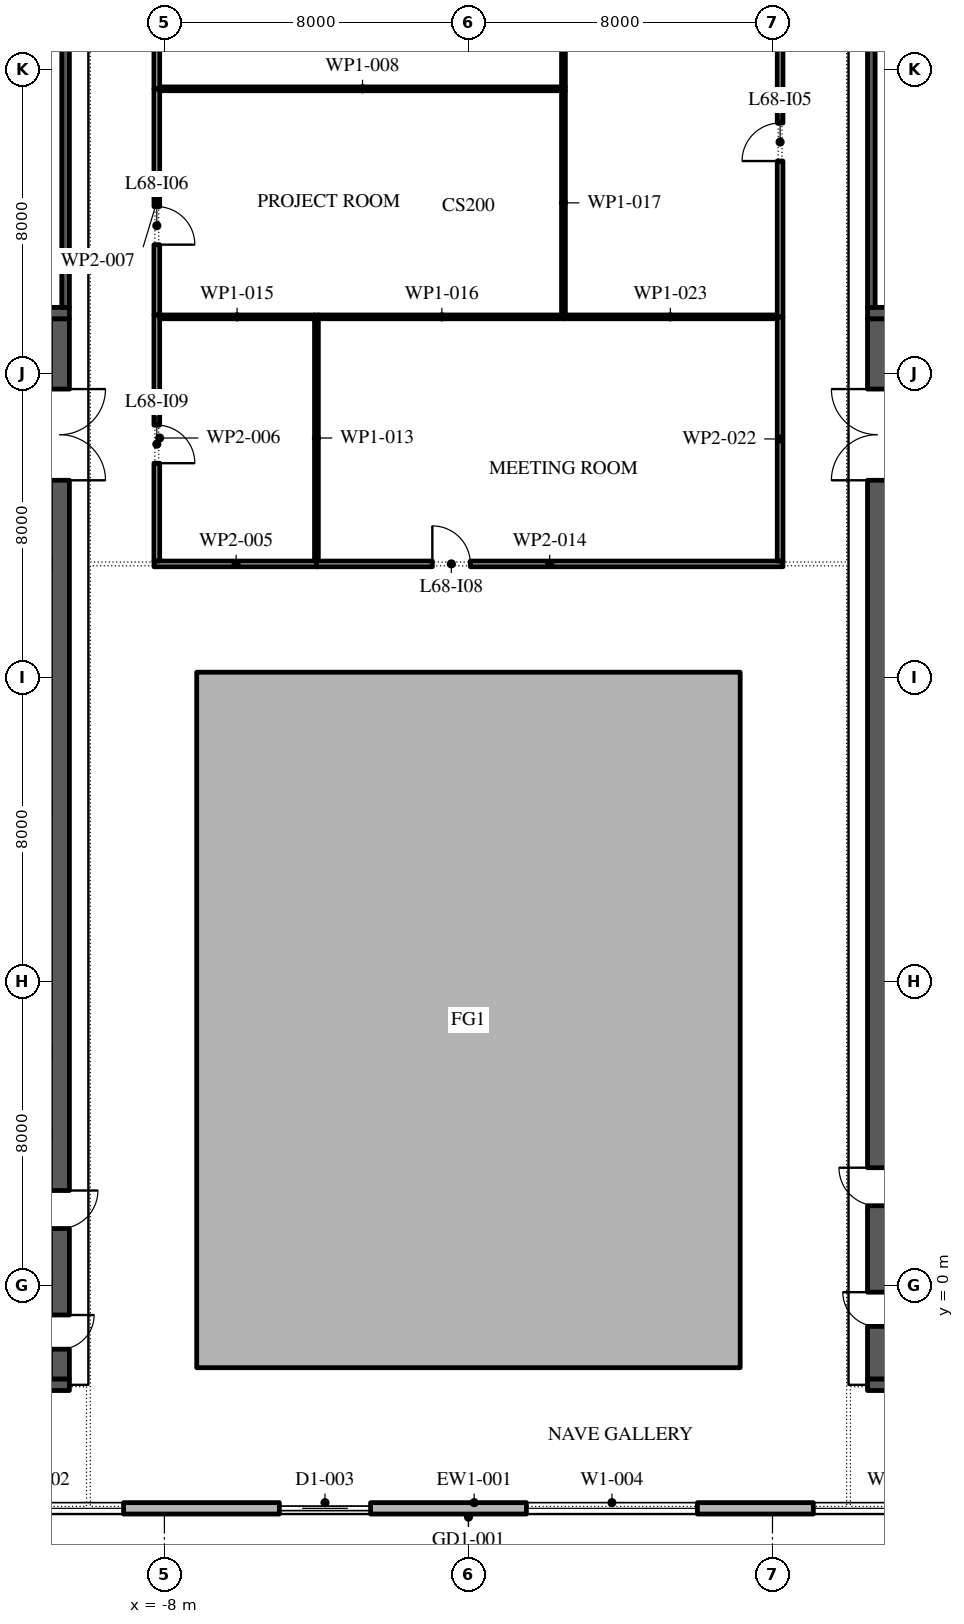
"""IFC4 building model, lengths in metres.
Left out: names, types, materials, properties, quantities, classifications, styles, units other than length and angle.
Written with IfcOpenShell. Run it as: python <this file> out.ifc"""

import sys

from ifc_helpers import new_model, si_unit, direction, frame, frame_2d, origin, place, context, subcontext, project, spatial, polyline, rectangle, outline, extrude, element, fill, save


model = new_model("IFC4")
c1 = context("Model", 3, precision=1e-05, world=origin(), true_north=direction((0.0, 1.0)))
c2 = subcontext(c1, "Body", "Model", "MODEL_VIEW")
j1 = project(units=[si_unit("LENGTHUNIT", "METRE"), si_unit("PLANEANGLEUNIT", "RADIAN")], contexts=[c1])
p1 = place(None, origin())
s1 = spatial("IfcSite", under=j1, at=p1, CompositionType="ELEMENT")
p2 = place(p1, origin())
s2 = spatial("IfcBuilding", under=s1, at=p2, CompositionType="ELEMENT")
p3 = place(p2, frame((0.0, 0.0, 313.2)))
s3 = spatial("IfcBuildingStorey", under=s2, at=p3, CompositionType="ELEMENT", Elevation=313.2)
p4 = place(p3, origin())
e1 = element("IfcWall", 1, at=p4, inside=s3, PredefinedType="STANDARD", context=c2, shape_type="SweptSolid", body=[
    extrude(outline(polyline([(-7.15, -2.15), (7.15, -2.15), (7.15, 16.15), (-7.15, 16.15), (-7.15, -2.15)]), holes=[polyline([(-7.0, -2.0), (-7.0, 16.0), (7.0, 16.0), (7.0, -2.0), (-7.0, -2.0)])]), origin(), (0.0, 0.0, 1.0), 4.0),
])
p5 = place(p3, frame((-22.35, -5.85, 0.0), z_axis=(0.0, 0.0, 1.0), x_axis=(1.0, 0.0, 0.0)))
e2 = element("IfcWall", 2, at=p5, inside=s3, PredefinedType="STANDARD", context=c2, shape_type="SweptSolid", body=[
    extrude(rectangle(XDim=45.0, YDim=0.3, at=frame_2d((22.5, 0.0))), origin(), (0.0, 0.0, 1.0), 4.0),
])
p6 = place(p5, frame((1.375, 0.0, 0.45)))
e3 = element("IfcOpeningElement", 3, at=p6, cuts=e2, PredefinedType="OPENING", context=c2, shape_type="SweptSolid", body=[
    extrude(rectangle(XDim=4.5, YDim=3.05, at=frame_2d((2.25, 1.525))), frame((0.0, 0.16, 0.0), z_axis=(0.0, -1.0, 0.0), x_axis=(1.0, 0.0, 0.0)), (0.0, 0.0, 1.0), 0.32),
])
p7 = place(p5, frame((8.775, 0.0, 0.45)))
e4 = element("IfcOpeningElement", 4, at=p7, cuts=e2, PredefinedType="OPENING", context=c2, shape_type="SweptSolid", body=[
    extrude(rectangle(XDim=4.5, YDim=3.05, at=frame_2d((2.25, 1.525))), frame((0.0, 0.16, 0.0), z_axis=(0.0, -1.0, 0.0), x_axis=(1.0, 0.0, 0.0)), (0.0, 0.0, 1.0), 0.32),
])
p8 = place(p5, frame((17.375, 0.0, 0.0)))
e5 = element("IfcOpeningElement", 5, at=p8, cuts=e2, PredefinedType="OPENING", context=c2, shape_type="SweptSolid", body=[
    extrude(rectangle(XDim=2.4, YDim=3.5, at=frame_2d((1.2, 1.75))), frame((0.0, 0.16, 0.0), z_axis=(0.0, -1.0, 0.0), x_axis=(1.0, 0.0, 0.0)), (0.0, 0.0, 1.0), 0.32),
])
p9 = place(p5, frame((23.875, 0.0, 0.45)))
e6 = element("IfcOpeningElement", 6, at=p9, cuts=e2, PredefinedType="OPENING", context=c2, shape_type="SweptSolid", body=[
    extrude(rectangle(XDim=4.5, YDim=3.05, at=frame_2d((2.25, 1.525))), frame((0.0, 0.16, 0.0), z_axis=(0.0, -1.0, 0.0), x_axis=(1.0, 0.0, 0.0)), (0.0, 0.0, 1.0), 0.32),
])
p10 = place(p5, frame((31.425, 0.0, 0.45)))
e7 = element("IfcOpeningElement", 7, at=p10, cuts=e2, PredefinedType="OPENING", context=c2, shape_type="SweptSolid", body=[
    extrude(rectangle(XDim=4.5, YDim=3.05, at=frame_2d((2.25, 1.525))), frame((0.0, 0.16, 0.0), z_axis=(0.0, -1.0, 0.0), x_axis=(1.0, 0.0, 0.0)), (0.0, 0.0, 1.0), 0.32),
])
p11 = place(p5, frame((38.975, 0.0, 0.45)))
e8 = element("IfcOpeningElement", 8, at=p11, cuts=e2, PredefinedType="OPENING", context=c2, shape_type="SweptSolid", body=[
    extrude(rectangle(XDim=4.5, YDim=3.05, at=frame_2d((2.25, 1.525))), frame((0.0, 0.16, 0.0), z_axis=(0.0, -1.0, 0.0), x_axis=(1.0, 0.0, 0.0)), (0.0, 0.0, 1.0), 0.32),
])
p12 = place(p3, frame((-10.75, -2.45, 0.0), z_axis=(0.0, 0.0, 1.0), x_axis=(0.0, 1.0, 0.0)))
e9 = element("IfcWall", 9, at=p12, inside=s3, PredefinedType="SHEAR", context=c2, shape_type="SweptSolid", body=[
    extrude(rectangle(XDim=27.9, YDim=0.5, at=frame_2d((13.95, 0.0))), origin(), (0.0, 0.0, 1.0), 4.0),
])
p13 = place(p12, frame((23.65, 0.0, 0.0)))
e10 = element("IfcOpeningElement", 10, at=p13, cuts=e9, PredefinedType="OPENING", context=c2, shape_type="SweptSolid", body=[
    extrude(rectangle(XDim=2.4, YDim=2.1, at=frame_2d((1.2, 1.05))), frame((0.0, 0.26, 0.0), z_axis=(0.0, -1.0, 0.0), x_axis=(1.0, 0.0, 0.0)), (0.0, 0.0, 1.0), 0.52),
])
p14 = place(p12, frame((0.788, 0.0, 0.0)))
e11 = element("IfcOpeningElement", 11, at=p14, cuts=e9, PredefinedType="OPENING", context=c2, shape_type="SweptSolid", body=[
    extrude(rectangle(XDim=0.9, YDim=2.1, at=frame_2d((0.45, 1.05))), frame((0.0, 0.26, 0.0), z_axis=(0.0, -1.0, 0.0), x_axis=(1.0, 0.0, 0.0)), (0.0, 0.0, 1.0), 0.52),
])
p15 = place(p12, frame((3.962, 0.0, 0.0)))
e12 = element("IfcOpeningElement", 12, at=p15, cuts=e9, PredefinedType="OPENING", context=c2, shape_type="SweptSolid", body=[
    extrude(rectangle(XDim=1.0, YDim=2.1, at=frame_2d((0.5, 1.05))), frame((0.0, 0.26, 0.0), z_axis=(0.0, -1.0, 0.0), x_axis=(1.0, 0.0, 0.0)), (0.0, 0.0, 1.0), 0.52),
])
for number, where, z_axis, x_axis in (
    (13, (-21.5, -2.6, 0.0), (0.0, 0.0, 1.0), (1.0, 0.0, 0.0)),
    (14, (-21.5, 25.6, 0.0), (0.0, 0.0, 1.0), (1.0, 0.0, 0.0)),
):
    element("IfcWall", number, at=place(p3, frame(where, z_axis=z_axis, x_axis=x_axis)), inside=s3, PredefinedType="SHEAR", context=c2, shape_type="SweptSolid", body=[
        extrude(rectangle(XDim=11.0, YDim=0.3, at=frame_2d((5.5, 0.0))), origin(), (0.0, 0.0, 1.0), 4.0),
    ])
p16 = place(p3, frame((-10.6, 25.75, 0.0), z_axis=(0.0, 0.0, 1.0), x_axis=(0.0, 1.0, 0.0)))
e15 = element("IfcWall", 15, at=p16, inside=s3, PredefinedType="SHEAR", context=c2, shape_type="SweptSolid", body=[
    extrude(rectangle(XDim=15.05, YDim=0.2, at=frame_2d((7.525, 0.0))), origin(), (0.0, 0.0, 1.0), 4.0),
])
p17 = place(p16, frame((7.075, 0.0, 0.0)))
e16 = element("IfcOpeningElement", 16, at=p17, cuts=e15, PredefinedType="OPENING", context=c2, shape_type="SweptSolid", body=[
    extrude(rectangle(XDim=0.9, YDim=2.1, at=frame_2d((0.45, 1.05))), frame((0.0, 0.11, 0.0), z_axis=(0.0, -1.0, 0.0), x_axis=(1.0, 0.0, 0.0)), (0.0, 0.0, 1.0), 0.22),
])
p18 = place(p3, frame((10.75, -2.45, 0.0), z_axis=(0.0, 0.0, 1.0), x_axis=(0.0, 1.0, 0.0)))
e17 = element("IfcWall", 17, at=p18, inside=s3, PredefinedType="SHEAR", context=c2, shape_type="SweptSolid", body=[
    extrude(rectangle(XDim=27.9, YDim=0.5, at=frame_2d((13.95, 0.0))), origin(), (0.0, 0.0, 1.0), 4.0),
])
p19 = place(p18, frame((23.65, 0.0, 0.0)))
e18 = element("IfcOpeningElement", 18, at=p19, cuts=e17, PredefinedType="OPENING", context=c2, shape_type="SweptSolid", body=[
    extrude(rectangle(XDim=2.4, YDim=2.1, at=frame_2d((1.2, 1.05))), frame((0.0, 0.26, 0.0), z_axis=(0.0, -1.0, 0.0), x_axis=(1.0, 0.0, 0.0)), (0.0, 0.0, 1.0), 0.52),
])
p20 = place(p18, frame((1.387, 0.0, 0.0)))
e19 = element("IfcOpeningElement", 19, at=p20, cuts=e17, PredefinedType="OPENING", context=c2, shape_type="SweptSolid", body=[
    extrude(rectangle(XDim=0.9, YDim=2.1, at=frame_2d((0.45, 1.05))), frame((0.0, 0.26, 0.0), z_axis=(0.0, -1.0, 0.0), x_axis=(1.0, 0.0, 0.0)), (0.0, 0.0, 1.0), 0.52),
])
p21 = place(p18, frame((4.562, 0.0, 0.0)))
e20 = element("IfcOpeningElement", 20, at=p21, cuts=e17, PredefinedType="OPENING", context=c2, shape_type="SweptSolid", body=[
    extrude(rectangle(XDim=1.0, YDim=2.1, at=frame_2d((0.5, 1.05))), frame((0.0, 0.26, 0.0), z_axis=(0.0, -1.0, 0.0), x_axis=(1.0, 0.0, 0.0)), (0.0, 0.0, 1.0), 0.52),
])
for number, where, z_axis, x_axis in (
    (21, (10.5, -2.6, 0.0), (0.0, 0.0, 1.0), (1.0, 0.0, 0.0)),
    (22, (10.5, 25.6, 0.0), (0.0, 0.0, 1.0), (1.0, 0.0, 0.0)),
):
    element("IfcWall", number, at=place(p3, frame(where, z_axis=z_axis, x_axis=x_axis)), inside=s3, PredefinedType="SHEAR", context=c2, shape_type="SweptSolid", body=[
        extrude(rectangle(XDim=11.0, YDim=0.3, at=frame_2d((5.5, 0.0))), origin(), (0.0, 0.0, 1.0), 4.0),
    ])
p22 = place(p3, frame((10.6, 25.75, 0.0), z_axis=(0.0, 0.0, 1.0), x_axis=(0.0, 1.0, 0.0)))
e23 = element("IfcWall", 23, at=p22, inside=s3, PredefinedType="SHEAR", context=c2, shape_type="SweptSolid", body=[
    extrude(rectangle(XDim=15.05, YDim=0.2, at=frame_2d((7.525, 0.0))), origin(), (0.0, 0.0, 1.0), 4.0),
])
p23 = place(p22, frame((7.075, 0.0, 0.0)))
e24 = element("IfcOpeningElement", 24, at=p23, cuts=e23, PredefinedType="OPENING", context=c2, shape_type="SweptSolid", body=[
    extrude(rectangle(XDim=0.9, YDim=2.1, at=frame_2d((0.45, 1.05))), frame((0.0, 0.11, 0.0), z_axis=(0.0, -1.0, 0.0), x_axis=(1.0, 0.0, 0.0)), (0.0, 0.0, 1.0), 0.22),
])
p24 = place(p3, frame((-8.275, 19.0, 0.0), z_axis=(0.0, 0.0, 1.0), x_axis=(1.0, 0.0, 0.0)))
e25 = element("IfcWall", 25, at=p24, inside=s3, PredefinedType="PARTITIONING", context=c2, shape_type="SweptSolid", body=[
    extrude(rectangle(XDim=4.325, YDim=0.15, at=frame_2d((2.163, 0.0))), origin(), (0.0, 0.0, 1.0), 4.0),
])
p25 = place(p3, frame((-8.2, 25.55, 0.0), z_axis=(0.0, 0.0, 1.0), x_axis=(0.0, -1.0, 0.0)))
e26 = element("IfcWall", 26, at=p25, inside=s3, PredefinedType="PARTITIONING", context=c2, shape_type="SweptSolid", body=[
    extrude(rectangle(XDim=6.475, YDim=0.15, at=frame_2d((3.238, 0.0))), origin(), (0.0, 0.0, 1.0), 4.0),
])
p26 = place(p25, frame((2.9, 0.0, 0.0)))
e27 = element("IfcOpeningElement", 27, at=p26, cuts=e26, PredefinedType="OPENING", context=c2, shape_type="SweptSolid", body=[
    extrude(rectangle(XDim=1.0, YDim=2.1, at=frame_2d((0.5, 1.05))), frame((0.0, 0.085, 0.0), z_axis=(0.0, -1.0, 0.0), x_axis=(1.0, 0.0, 0.0)), (0.0, 0.0, 1.0), 0.17),
])
p27 = place(p3, frame((-8.2, 31.5, 0.0), z_axis=(0.0, 0.0, 1.0), x_axis=(0.0, -1.0, 0.0)))
e28 = element("IfcWall", 28, at=p27, inside=s3, PredefinedType="PARTITIONING", context=c2, shape_type="SweptSolid", body=[
    extrude(rectangle(XDim=5.95, YDim=0.15, at=frame_2d((2.975, 0.0))), origin(), (0.0, 0.0, 1.0), 4.0),
])
p28 = place(p27, frame((3.1, 0.0, 0.0)))
e29 = element("IfcOpeningElement", 29, at=p28, cuts=e28, PredefinedType="OPENING", context=c2, shape_type="SweptSolid", body=[
    extrude(rectangle(XDim=1.0, YDim=2.1, at=frame_2d((0.5, 1.05))), frame((0.0, 0.085, 0.0), z_axis=(0.0, -1.0, 0.0), x_axis=(1.0, 0.0, 0.0)), (0.0, 0.0, 1.0), 0.17),
])
p29 = place(p3, frame((-8.125, 31.5, 0.0), z_axis=(0.0, 0.0, 1.0), x_axis=(1.0, 0.0, 0.0)))
e30 = element("IfcWall", 30, at=p29, inside=s3, PredefinedType="PARTITIONING", context=c2, shape_type="SweptSolid", body=[
    extrude(rectangle(XDim=10.675, YDim=0.1, at=frame_2d((5.337, 0.0))), origin(), (0.0, 0.0, 1.0), 4.0),
])
p30 = place(p3, frame((-8.2, 41.075, 0.0), z_axis=(0.0, 0.0, 1.0), x_axis=(0.0, -1.0, 0.0)))
e31 = element("IfcWall", 31, at=p30, inside=s3, PredefinedType="PARTITIONING", context=c2, shape_type="SweptSolid", body=[
    extrude(rectangle(XDim=9.575, YDim=0.15, at=frame_2d((4.788, 0.0))), origin(), (0.0, 0.0, 1.0), 4.0),
])
p31 = place(p3, frame((-4.0, 19.075, 0.0), z_axis=(0.0, 0.0, 1.0), x_axis=(0.0, 1.0, 0.0)))
e32 = element("IfcWall", 32, at=p31, inside=s3, PredefinedType="PARTITIONING", context=c2, shape_type="SweptSolid", body=[
    extrude(rectangle(XDim=6.475, YDim=0.1, at=frame_2d((3.238, 0.0))), origin(), (0.0, 0.0, 1.0), 4.0),
])
p32 = place(p3, frame((-4.0, 19.0, 0.0), z_axis=(0.0, 0.0, 1.0), x_axis=(1.0, 0.0, 0.0)))
e33 = element("IfcWall", 33, at=p32, inside=s3, PredefinedType="PARTITIONING", context=c2, shape_type="SweptSolid", body=[
    extrude(rectangle(XDim=12.275, YDim=0.15, at=frame_2d((6.137, 0.0))), origin(), (0.0, 0.0, 1.0), 4.0),
])
p33 = place(p32, frame((3.05, 0.0, 0.0)))
e34 = element("IfcOpeningElement", 34, at=p33, cuts=e33, PredefinedType="OPENING", context=c2, shape_type="SweptSolid", body=[
    extrude(rectangle(XDim=1.0, YDim=2.1, at=frame_2d((0.5, 1.05))), frame((0.0, 0.085, 0.0), z_axis=(0.0, -1.0, 0.0), x_axis=(1.0, 0.0, 0.0)), (0.0, 0.0, 1.0), 0.17),
])
p34 = place(p3, frame((-4.05, 25.5, 0.0), z_axis=(0.0, 0.0, 1.0), x_axis=(-1.0, 0.0, 0.0)))
e35 = element("IfcWall", 35, at=p34, inside=s3, PredefinedType="PARTITIONING", context=c2, shape_type="SweptSolid", body=[
    extrude(rectangle(XDim=4.075, YDim=0.1, at=frame_2d((2.038, 0.0))), origin(), (0.0, 0.0, 1.0), 4.0),
])
p35 = place(p3, frame((2.55, 25.5, 0.0), z_axis=(0.0, 0.0, 1.0), x_axis=(-1.0, 0.0, 0.0)))
e36 = element("IfcWall", 36, at=p35, inside=s3, PredefinedType="PARTITIONING", context=c2, shape_type="SweptSolid", body=[
    extrude(rectangle(XDim=6.5, YDim=0.1, at=frame_2d((3.25, 0.0))), origin(), (0.0, 0.0, 1.0), 4.0),
])
p36 = place(p3, frame((2.5, 25.55, 0.0), z_axis=(0.0, 0.0, 1.0), x_axis=(0.0, 1.0, 0.0)))
e37 = element("IfcWall", 37, at=p36, inside=s3, PredefinedType="PARTITIONING", context=c2, shape_type="SweptSolid", body=[
    extrude(rectangle(XDim=5.9, YDim=0.1, at=frame_2d((2.95, 0.0))), origin(), (0.0, 0.0, 1.0), 4.0),
])
p37 = place(p3, frame((2.5, 31.55, 0.0), z_axis=(0.0, 0.0, 1.0), x_axis=(0.0, 1.0, 0.0)))
e38 = element("IfcWall", 38, at=p37, inside=s3, PredefinedType="PARTITIONING", context=c2, shape_type="SweptSolid", body=[
    extrude(rectangle(XDim=9.525, YDim=0.1, at=frame_2d((4.762, 0.0))), origin(), (0.0, 0.0, 1.0), 4.0),
])
p38 = place(p3, frame((8.2, 19.075, 0.0), z_axis=(0.0, 0.0, 1.0), x_axis=(0.0, 1.0, 0.0)))
e39 = element("IfcWall", 39, at=p38, inside=s3, PredefinedType="PARTITIONING", context=c2, shape_type="SweptSolid", body=[
    extrude(rectangle(XDim=6.425, YDim=0.15, at=frame_2d((3.212, 0.0))), origin(), (0.0, 0.0, 1.0), 4.0),
])
p39 = place(p3, frame((8.125, 25.5, 0.0), z_axis=(0.0, 0.0, 1.0), x_axis=(-1.0, 0.0, 0.0)))
e40 = element("IfcWall", 40, at=p39, inside=s3, PredefinedType="PARTITIONING", context=c2, shape_type="SweptSolid", body=[
    extrude(rectangle(XDim=5.625, YDim=0.1, at=frame_2d((2.812, 0.0))), origin(), (0.0, 0.0, 1.0), 4.0),
])
p40 = place(p3, frame((8.2, 25.5, 0.0), z_axis=(0.0, 0.0, 1.0), x_axis=(0.0, 1.0, 0.0)))
e41 = element("IfcWall", 41, at=p40, inside=s3, PredefinedType="PARTITIONING", context=c2, shape_type="SweptSolid", body=[
    extrude(rectangle(XDim=15.575, YDim=0.15, at=frame_2d((7.788, 0.0))), origin(), (0.0, 0.0, 1.0), 4.0),
])
p41 = place(p40, frame((4.1, 0.0, 0.0)))
e42 = element("IfcOpeningElement", 42, at=p41, cuts=e41, PredefinedType="OPENING", context=c2, shape_type="SweptSolid", body=[
    extrude(rectangle(XDim=1.0, YDim=2.1, at=frame_2d((0.5, 1.05))), frame((0.0, 0.085, 0.0), z_axis=(0.0, -1.0, 0.0), x_axis=(1.0, 0.0, 0.0)), (0.0, 0.0, 1.0), 0.17),
])
p42 = place(p7, origin())
e43 = element("IfcWindow", 43, at=p42, inside=s3, PartitioningType="DOUBLE_PANEL_VERTICAL", PredefinedType="WINDOW", context=c2, shape_type="SweptSolid", body=[
    extrude(rectangle(XDim=4.5, YDim=3.05, at=frame_2d((2.25, 1.525))), frame((0.0, 0.03, 0.0), z_axis=(0.0, -1.0, 0.0), x_axis=(1.0, 0.0, 0.0)), (0.0, 0.0, 1.0), 0.06),
])
fill(e4, e43)
p43 = place(p8, origin())
e44 = element("IfcDoor", 44, at=p43, inside=s3, OperationType="DOUBLE_DOOR_SLIDING", PredefinedType="DOOR", context=c2, shape_type="SweptSolid", body=[
    extrude(rectangle(XDim=2.4, YDim=3.5, at=frame_2d((1.2, 1.75))), frame((0.0, 0.025, 0.0), z_axis=(0.0, -1.0, 0.0), x_axis=(1.0, 0.0, 0.0)), (0.0, 0.0, 1.0), 0.05),
])
fill(e5, e44)
p44 = place(p9, origin())
e45 = element("IfcWindow", 45, at=p44, inside=s3, PartitioningType="DOUBLE_PANEL_VERTICAL", PredefinedType="WINDOW", context=c2, shape_type="SweptSolid", body=[
    extrude(rectangle(XDim=4.5, YDim=3.05, at=frame_2d((2.25, 1.525))), frame((0.0, 0.03, 0.0), z_axis=(0.0, -1.0, 0.0), x_axis=(1.0, 0.0, 0.0)), (0.0, 0.0, 1.0), 0.06),
])
fill(e6, e45)
p45 = place(p10, origin())
e46 = element("IfcWindow", 46, at=p45, inside=s3, PartitioningType="DOUBLE_PANEL_VERTICAL", PredefinedType="WINDOW", context=c2, shape_type="SweptSolid", body=[
    extrude(rectangle(XDim=4.5, YDim=3.05, at=frame_2d((2.25, 1.525))), frame((0.0, 0.03, 0.0), z_axis=(0.0, -1.0, 0.0), x_axis=(1.0, 0.0, 0.0)), (0.0, 0.0, 1.0), 0.06),
])
fill(e7, e46)
p46 = place(p13, frame((2.4, 0.0, 0.0), z_axis=(0.0, 0.0, 1.0), x_axis=(-1.0, 0.0, 0.0)))
e47 = element("IfcDoor", 47, at=p46, inside=s3, OperationType="DOUBLE_DOOR_SINGLE_SWING", PredefinedType="DOOR", context=c2, shape_type="SweptSolid", body=[
    extrude(rectangle(XDim=2.4, YDim=2.1, at=frame_2d((1.2, 1.05))), frame((0.0, 0.025, 0.0), z_axis=(0.0, -1.0, 0.0), x_axis=(1.0, 0.0, 0.0)), (0.0, 0.0, 1.0), 0.05),
])
fill(e10, e47)
p47 = place(p19, origin())
e48 = element("IfcDoor", 48, at=p47, inside=s3, OperationType="DOUBLE_DOOR_SINGLE_SWING", PredefinedType="DOOR", context=c2, shape_type="SweptSolid", body=[
    extrude(rectangle(XDim=2.4, YDim=2.1, at=frame_2d((1.2, 1.05))), frame((0.0, 0.025, 0.0), z_axis=(0.0, -1.0, 0.0), x_axis=(1.0, 0.0, 0.0)), (0.0, 0.0, 1.0), 0.05),
])
fill(e18, e48)
p48 = place(p41, origin())
e49 = element("IfcDoor", 49, at=p48, inside=s3, OperationType="SINGLE_SWING_RIGHT", PredefinedType="DOOR", context=c2, shape_type="SweptSolid", body=[
    extrude(rectangle(XDim=1.0, YDim=2.1, at=frame_2d((0.5, 1.05))), frame((0.0, 0.025, 0.0), z_axis=(0.0, -1.0, 0.0), x_axis=(1.0, 0.0, 0.0)), (0.0, 0.0, 1.0), 0.05),
])
fill(e42, e49)
p49 = place(p28, origin())
e50 = element("IfcDoor", 50, at=p49, inside=s3, OperationType="SINGLE_SWING_LEFT", PredefinedType="DOOR", context=c2, shape_type="SweptSolid", body=[
    extrude(rectangle(XDim=1.0, YDim=2.1, at=frame_2d((0.5, 1.05))), frame((0.0, 0.025, 0.0), z_axis=(0.0, -1.0, 0.0), x_axis=(1.0, 0.0, 0.0)), (0.0, 0.0, 1.0), 0.05),
])
fill(e29, e50)
p50 = place(p33, origin())
e51 = element("IfcDoor", 51, at=p50, inside=s3, OperationType="SINGLE_SWING_RIGHT", PredefinedType="DOOR", context=c2, shape_type="SweptSolid", body=[
    extrude(rectangle(XDim=1.0, YDim=2.1, at=frame_2d((0.5, 1.05))), frame((0.0, 0.025, 0.0), z_axis=(0.0, -1.0, 0.0), x_axis=(1.0, 0.0, 0.0)), (0.0, 0.0, 1.0), 0.05),
])
fill(e34, e51)
p51 = place(p26, origin())
e52 = element("IfcDoor", 52, at=p51, inside=s3, OperationType="SINGLE_SWING_LEFT", PredefinedType="DOOR", context=c2, shape_type="SweptSolid", body=[
    extrude(rectangle(XDim=1.0, YDim=2.1, at=frame_2d((0.5, 1.05))), frame((0.0, 0.025, 0.0), z_axis=(0.0, -1.0, 0.0), x_axis=(1.0, 0.0, 0.0)), (0.0, 0.0, 1.0), 0.05),
])
fill(e27, e52)
save(model, sys.argv[1])
